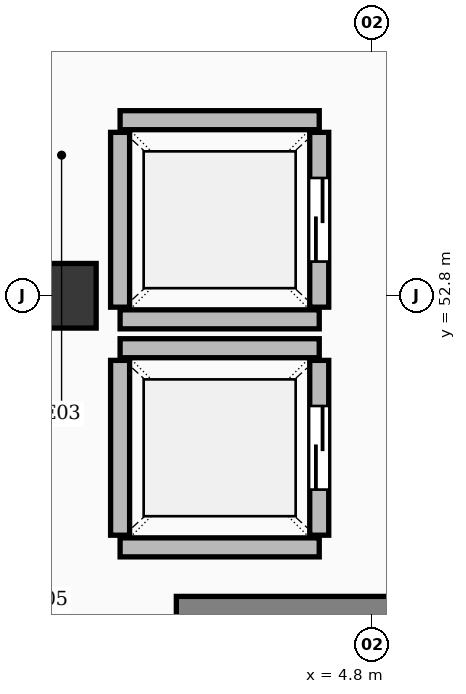
"""IFC4 building model, lengths in metres.
Left out: names, types, materials, properties, quantities, classifications, styles, units other than length and angle.
Written with IfcOpenShell. Run it as: python <this file> out.ifc"""

import sys

from ifc_helpers import new_model, si_unit, direction, frame, frame_2d, origin, origin_2d, place, context, subcontext, project, spatial, rectangle, extrude, element, fill, save


model = new_model("IFC4")
c1 = context("Model", 3, precision=1e-05, world=origin(), true_north=direction((0.0, 1.0)))
c2 = subcontext(c1, "Body", "Model", "MODEL_VIEW")
j1 = project(units=[si_unit("LENGTHUNIT", "METRE"), si_unit("PLANEANGLEUNIT", "RADIAN")], contexts=[c1])
p1 = place(None, origin())
s1 = spatial("IfcSite", under=j1, at=p1, CompositionType="ELEMENT")
p2 = place(p1, origin())
s2 = spatial("IfcBuilding", under=s1, at=p2, CompositionType="ELEMENT")
p3 = place(p2, origin())
s3 = spatial("IfcBuildingStorey", under=s2, at=p3, CompositionType="ELEMENT", Elevation=0.0)
p4 = place(p3, frame((0.75, 52.8, 0.0), z_axis=(0.0, 0.0, 1.0), x_axis=(1.0, 0.0, 0.0)))
e1 = element("IfcColumn", 1, at=p4, inside=s3, PredefinedType="COLUMN", context=c2, shape_type="SweptSolid", body=[
    extrude(rectangle(XDim=0.85, YDim=0.85, at=origin_2d()), origin(), (0.0, 0.0, 1.0), 6.0),
])
p5 = place(p3, frame((2.23, 48.62, 0.0), z_axis=(0.0, 0.0, 1.0), x_axis=(1.0, 0.0, 0.0)))
e2 = element("IfcWall", 2, at=p5, inside=s3, PredefinedType="SHEAR", context=c2, shape_type="SweptSolid", body=[
    extrude(rectangle(XDim=5.15, YDim=0.45, at=frame_2d((2.575, 0.0))), origin(), (0.0, 0.0, 1.0), 5.7),
])
for number, where, z_axis, x_axis in (
    (3, (1.49, 49.49, 0.0), (0.0, 0.0, 1.0), (1.0, 0.0, 0.0)),
    (4, (1.49, 52.11, 0.0), (0.0, 0.0, 1.0), (1.0, 0.0, 0.0)),
):
    element("IfcWall", number, at=place(p3, frame(where, z_axis=z_axis, x_axis=x_axis)), inside=s3, PredefinedType="SOLIDWALL", context=c2, shape_type="SweptSolid", body=[
        extrude(rectangle(XDim=2.62, YDim=0.25, at=frame_2d((1.31, 0.0))), origin(), (0.0, 0.0, 1.0), 5.7),
    ])
p6 = place(p3, frame((1.49, 49.65, 0.0), z_axis=(0.0, 0.0, 1.0), x_axis=(0.0, 1.0, 0.0)))
e5 = element("IfcWall", 5, at=p6, inside=s3, PredefinedType="SOLIDWALL", context=c2, shape_type="SweptSolid", body=[
    extrude(rectangle(XDim=2.3, YDim=0.25, at=frame_2d((1.15, 0.0))), origin(), (0.0, 0.0, 1.0), 5.7),
])
p7 = place(p3, frame((4.11, 49.65, 0.0), z_axis=(0.0, 0.0, 1.0), x_axis=(0.0, 1.0, 0.0)))
e6 = element("IfcWall", 6, at=p7, inside=s3, PredefinedType="SOLIDWALL", context=c2, shape_type="SweptSolid", body=[
    extrude(rectangle(XDim=2.3, YDim=0.25, at=frame_2d((1.15, 0.0))), origin(), (0.0, 0.0, 1.0), 5.7),
])
p8 = place(p7, frame((0.6, 0.0, 0.0)))
e7 = element("IfcOpeningElement", 7, at=p8, cuts=e6, PredefinedType="OPENING", context=c2, shape_type="SweptSolid", body=[
    extrude(rectangle(XDim=1.1, YDim=2.2, at=frame_2d((0.55, 1.1))), frame((0.0, 0.137, 0.0), z_axis=(0.0, -1.0, 0.0), x_axis=(1.0, 0.0, 0.0)), (0.0, 0.0, 1.0), 0.274),
])
p9 = place(p3, frame((1.49, 52.49, 0.0), z_axis=(0.0, 0.0, 1.0), x_axis=(1.0, 0.0, 0.0)))
e8 = element("IfcWall", 8, at=p9, inside=s3, PredefinedType="SOLIDWALL", context=c2, shape_type="SweptSolid", body=[
    extrude(rectangle(XDim=2.62, YDim=0.25, at=frame_2d((1.31, 0.0))), origin(), (0.0, 0.0, 1.0), 4.592),
])
p10 = place(p3, frame((1.49, 55.11, 0.0), z_axis=(0.0, 0.0, 1.0), x_axis=(1.0, 0.0, 0.0)))
e9 = element("IfcWall", 9, at=p10, inside=s3, PredefinedType="SOLIDWALL", context=c2, shape_type="SweptSolid", body=[
    extrude(rectangle(XDim=2.62, YDim=0.25, at=frame_2d((1.31, 0.0))), origin(), (0.0, 0.0, 1.0), 5.7),
])
p11 = place(p3, frame((1.49, 52.65, 0.0), z_axis=(0.0, 0.0, 1.0), x_axis=(0.0, 1.0, 0.0)))
e10 = element("IfcWall", 10, at=p11, inside=s3, PredefinedType="SOLIDWALL", context=c2, shape_type="SweptSolid", body=[
    extrude(rectangle(XDim=2.3, YDim=0.25, at=frame_2d((1.15, 0.0))), origin(), (0.0, 0.0, 1.0), 4.592),
])
p12 = place(p3, frame((4.11, 52.65, 0.0), z_axis=(0.0, 0.0, 1.0), x_axis=(0.0, 1.0, 0.0)))
e11 = element("IfcWall", 11, at=p12, inside=s3, PredefinedType="SOLIDWALL", context=c2, shape_type="SweptSolid", body=[
    extrude(rectangle(XDim=2.3, YDim=0.25, at=frame_2d((1.15, 0.0))), origin(), (0.0, 0.0, 1.0), 4.592),
])
p13 = place(p12, frame((0.6, 0.0, 0.0)))
e12 = element("IfcOpeningElement", 12, at=p13, cuts=e11, PredefinedType="OPENING", context=c2, shape_type="SweptSolid", body=[
    extrude(rectangle(XDim=1.1, YDim=2.2, at=frame_2d((0.55, 1.1))), frame((0.0, 0.137, 0.0), z_axis=(0.0, -1.0, 0.0), x_axis=(1.0, 0.0, 0.0)), (0.0, 0.0, 1.0), 0.274),
])
p14 = place(p8, origin())
e13 = element("IfcDoor", 13, at=p14, inside=s3, OperationType="SLIDING_TO_LEFT", PredefinedType="DOOR", context=c2, shape_type="SweptSolid", body=[
    extrude(rectangle(XDim=1.1, YDim=2.2, at=frame_2d((0.55, 1.1))), frame((0.0, 0.025, 0.0), z_axis=(0.0, -1.0, 0.0), x_axis=(1.0, 0.0, 0.0)), (0.0, 0.0, 1.0), 0.05),
])
fill(e7, e13)
p15 = place(p13, origin())
e14 = element("IfcDoor", 14, at=p15, inside=s3, OperationType="SLIDING_TO_LEFT", PredefinedType="DOOR", context=c2, shape_type="SweptSolid", body=[
    extrude(rectangle(XDim=1.1, YDim=2.2, at=frame_2d((0.55, 1.1))), frame((0.0, 0.025, 0.0), z_axis=(0.0, -1.0, 0.0), x_axis=(1.0, 0.0, 0.0)), (0.0, 0.0, 1.0), 0.05),
])
fill(e12, e14)
save(model, sys.argv[1])
